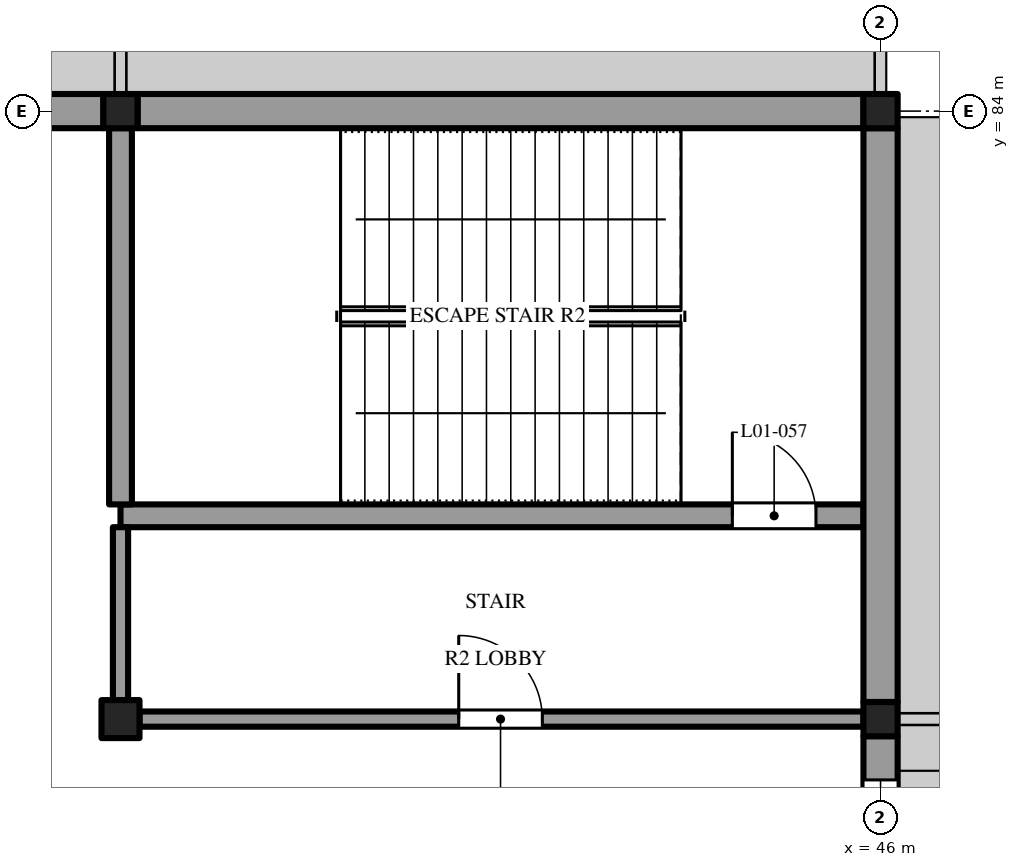
"""IFC4 building model, lengths in metres.
Left out: names, types, materials, properties, quantities, classifications, styles, units other than length and angle.
Written with IfcOpenShell. Run it as: python <this file> out.ifc"""

import sys

from ifc_helpers import new_model, si_unit, direction, frame, frame_2d, origin, origin_2d, place, context, subcontext, project, spatial, rectangle, extrude, element, fill, save


model = new_model("IFC4")
c1 = context("Model", 3, precision=1e-05, world=origin(), true_north=direction((0.0, 1.0)))
c2 = subcontext(c1, "Body", "Model", "MODEL_VIEW")
j1 = project(units=[si_unit("LENGTHUNIT", "METRE"), si_unit("PLANEANGLEUNIT", "RADIAN")], contexts=[c1])
p1 = place(None, origin())
s1 = spatial("IfcSite", under=j1, at=p1, CompositionType="ELEMENT")
p2 = place(p1, origin())
s2 = spatial("IfcBuilding", under=s1, at=p2, CompositionType="ELEMENT")
p3 = place(p2, frame((0.0, 0.0, 7.2)))
s3 = spatial("IfcBuildingStorey", under=s2, at=p3, CompositionType="ELEMENT", Elevation=7.2)
p4 = place(p3, frame((36.0, 76.0, 0.0), z_axis=(0.0, 0.0, 1.0), x_axis=(1.0, 0.0, 0.0)))
e1 = element("IfcColumn", 1, at=p4, inside=s3, PredefinedType="COLUMN", context=c2, shape_type="SweptSolid", body=[
    extrude(rectangle(XDim=0.5, YDim=0.5, at=origin_2d()), origin(), (0.0, 0.0, 1.0), 4.8),
])
for number, where, z_axis, x_axis in (
    (2, (36.0, 84.0, 0.0), (0.0, 0.0, 1.0), (1.0, 0.0, 0.0)),
    (3, (46.0, 76.0, 0.0), (0.0, 0.0, 1.0), (1.0, 0.0, 0.0)),
    (4, (46.0, 84.0, 0.0), (0.0, 0.0, 1.0), (1.0, 0.0, 0.0)),
):
    element("IfcColumn", number, at=place(p3, frame(where, z_axis=z_axis, x_axis=x_axis)), inside=s3, PredefinedType="COLUMN", context=c2, shape_type="SweptSolid", body=[
        extrude(rectangle(XDim=0.45, YDim=0.45, at=origin_2d()), origin(), (0.0, 0.0, 1.0), 4.8),
    ])
p5 = place(p3, frame((36.25, 76.0, 0.0), z_axis=(0.0, 0.0, 1.0), x_axis=(1.0, 0.0, 0.0)))
e5 = element("IfcWall", 5, at=p5, inside=s3, PredefinedType="SOLIDWALL", context=c2, shape_type="SweptSolid", body=[
    extrude(rectangle(XDim=9.525, YDim=0.2, at=frame_2d((4.762, 0.0))), origin(), (0.0, 0.0, 1.0), 4.45),
])
p6 = place(p5, frame((4.2, 0.0, 0.0)))
e6 = element("IfcOpeningElement", 6, at=p6, cuts=e5, PredefinedType="OPENING", context=c2, shape_type="SweptSolid", body=[
    extrude(rectangle(XDim=1.1, YDim=2.1, at=frame_2d((0.55, 1.05))), frame((0.0, 0.11, 0.0), z_axis=(0.0, -1.0, 0.0), x_axis=(1.0, 0.0, 0.0)), (0.0, 0.0, 1.0), 0.22),
])
p7 = place(p3, frame((36.0, 78.675, 0.0), z_axis=(0.0, 0.0, 1.0), x_axis=(1.0, 0.0, 0.0)))
e7 = element("IfcWall", 7, at=p7, inside=s3, PredefinedType="SHEAR", context=c2, shape_type="SweptSolid", body=[
    extrude(rectangle(XDim=9.775, YDim=0.3, at=frame_2d((4.887, 0.0))), origin(), (0.0, 0.0, 1.0), 4.45),
])
p8 = place(p7, frame((8.05, 0.0, 0.0)))
e8 = element("IfcOpeningElement", 8, at=p8, cuts=e7, PredefinedType="OPENING", context=c2, shape_type="SweptSolid", body=[
    extrude(rectangle(XDim=1.1, YDim=2.1, at=frame_2d((0.55, 1.05))), frame((0.0, 0.16, 0.0), z_axis=(0.0, -1.0, 0.0), x_axis=(1.0, 0.0, 0.0)), (0.0, 0.0, 1.0), 0.32),
])
p9 = place(p3, frame((35.775, 84.0, 0.0), z_axis=(0.0, 0.0, 1.0), x_axis=(-1.0, 0.0, 0.0)))
e9 = element("IfcWall", 9, at=p9, inside=s3, PredefinedType="SOLIDWALL", context=c2, shape_type="SweptSolid", body=[
    extrude(rectangle(XDim=9.55, YDim=0.45, at=frame_2d((4.775, 0.0))), origin(), (0.0, 0.0, 1.0), 4.45),
])
p10 = place(p9, frame((6.075, 0.0, 0.9)))
e10 = element("IfcOpeningElement", 10, at=p10, cuts=e9, PredefinedType="OPENING", context=c2, shape_type="SweptSolid", body=[
    extrude(rectangle(XDim=2.4, YDim=2.2, at=frame_2d((1.2, 1.1))), frame((0.0, 0.235, 0.0), z_axis=(0.0, -1.0, 0.0), x_axis=(1.0, 0.0, 0.0)), (0.0, 0.0, 1.0), 0.47),
])
p11 = place(p9, frame((1.075, 0.0, 0.9)))
e11 = element("IfcOpeningElement", 11, at=p11, cuts=e9, PredefinedType="OPENING", context=c2, shape_type="SweptSolid", body=[
    extrude(rectangle(XDim=2.4, YDim=2.2, at=frame_2d((1.2, 1.1))), frame((0.0, 0.235, 0.0), z_axis=(0.0, -1.0, 0.0), x_axis=(1.0, 0.0, 0.0)), (0.0, 0.0, 1.0), 0.47),
])
p12 = place(p3, frame((45.775, 84.0, 0.0), z_axis=(0.0, 0.0, 1.0), x_axis=(-1.0, 0.0, 0.0)))
e12 = element("IfcWall", 12, at=p12, inside=s3, PredefinedType="SOLIDWALL", context=c2, shape_type="SweptSolid", body=[
    extrude(rectangle(XDim=9.55, YDim=0.45, at=frame_2d((4.775, 0.0))), origin(), (0.0, 0.0, 1.0), 4.45),
])
p13 = place(p3, frame((36.0, 76.25, 0.0), z_axis=(0.0, 0.0, 1.0), x_axis=(0.0, 1.0, 0.0)))
e13 = element("IfcWall", 13, at=p13, inside=s3, PredefinedType="SOLIDWALL", context=c2, shape_type="SweptSolid", body=[
    extrude(rectangle(XDim=2.275, YDim=0.2, at=frame_2d((1.137, 0.0))), origin(), (0.0, 0.0, 1.0), 4.45),
])
p14 = place(p3, frame((36.0, 78.825, 0.0), z_axis=(0.0, 0.0, 1.0), x_axis=(0.0, 1.0, 0.0)))
e14 = element("IfcWall", 14, at=p14, inside=s3, PredefinedType="SHEAR", context=c2, shape_type="SweptSolid", body=[
    extrude(rectangle(XDim=4.95, YDim=0.3, at=frame_2d((2.475, 0.0))), origin(), (0.0, 0.0, 1.0), 4.45),
])
p15 = place(p3, frame((46.0, 68.225, 0.0), z_axis=(0.0, 0.0, 1.0), x_axis=(0.0, 1.0, 0.0)))
e15 = element("IfcWall", 15, at=p15, inside=s3, PredefinedType="SOLIDWALL", context=c2, shape_type="SweptSolid", body=[
    extrude(rectangle(XDim=7.55, YDim=0.45, at=frame_2d((3.775, 0.0))), origin(), (0.0, 0.0, 1.0), 4.45),
])
p16 = place(p15, frame((0.575, 0.0, 0.9)))
e16 = element("IfcOpeningElement", 16, at=p16, cuts=e15, PredefinedType="OPENING", context=c2, shape_type="SweptSolid", body=[
    extrude(rectangle(XDim=2.4, YDim=2.2, at=frame_2d((1.2, 1.1))), frame((0.0, 0.235, 0.0), z_axis=(0.0, -1.0, 0.0), x_axis=(1.0, 0.0, 0.0)), (0.0, 0.0, 1.0), 0.47),
])
p17 = place(p15, frame((4.575, 0.0, 0.9)))
e17 = element("IfcOpeningElement", 17, at=p17, cuts=e15, PredefinedType="OPENING", context=c2, shape_type="SweptSolid", body=[
    extrude(rectangle(XDim=2.4, YDim=2.2, at=frame_2d((1.2, 1.1))), frame((0.0, 0.235, 0.0), z_axis=(0.0, -1.0, 0.0), x_axis=(1.0, 0.0, 0.0)), (0.0, 0.0, 1.0), 0.47),
])
p18 = place(p3, frame((46.0, 76.225, 0.0), z_axis=(0.0, 0.0, 1.0), x_axis=(0.0, 1.0, 0.0)))
e18 = element("IfcWall", 18, at=p18, inside=s3, PredefinedType="SOLIDWALL", context=c2, shape_type="SweptSolid", body=[
    extrude(rectangle(XDim=7.55, YDim=0.45, at=frame_2d((3.775, 0.0))), origin(), (0.0, 0.0, 1.0), 4.45),
])
p19 = place(p6, origin())
e19 = element("IfcDoor", 19, at=p19, inside=s3, OperationType="SINGLE_SWING_LEFT", PredefinedType="DOOR", context=c2, shape_type="SweptSolid", body=[
    extrude(rectangle(XDim=1.1, YDim=2.1, at=frame_2d((0.55, 1.05))), frame((0.0, 0.025, 0.0), z_axis=(0.0, -1.0, 0.0), x_axis=(1.0, 0.0, 0.0)), (0.0, 0.0, 1.0), 0.05),
])
fill(e6, e19)
p20 = place(p8, origin())
e20 = element("IfcDoor", 20, at=p20, inside=s3, OperationType="SINGLE_SWING_RIGHT", PredefinedType="DOOR", context=c2, shape_type="SweptSolid", body=[
    extrude(rectangle(XDim=1.1, YDim=2.1, at=frame_2d((0.55, 1.05))), frame((0.0, 0.025, 0.0), z_axis=(0.0, -1.0, 0.0), x_axis=(1.0, 0.0, 0.0)), (0.0, 0.0, 1.0), 0.05),
])
fill(e8, e20)
p21 = place(p17, origin())
e21 = element("IfcWindow", 21, at=p21, inside=s3, PartitioningType="SINGLE_PANEL", PredefinedType="WINDOW", context=c2, shape_type="SweptSolid", body=[
    extrude(rectangle(XDim=2.4, YDim=2.2, at=frame_2d((1.2, 1.1))), frame((0.0, 0.215, 0.0), z_axis=(0.0, -1.0, 0.0), x_axis=(1.0, 0.0, 0.0)), (0.0, 0.0, 1.0), 0.06),
])
fill(e17, e21)
save(model, sys.argv[1])
